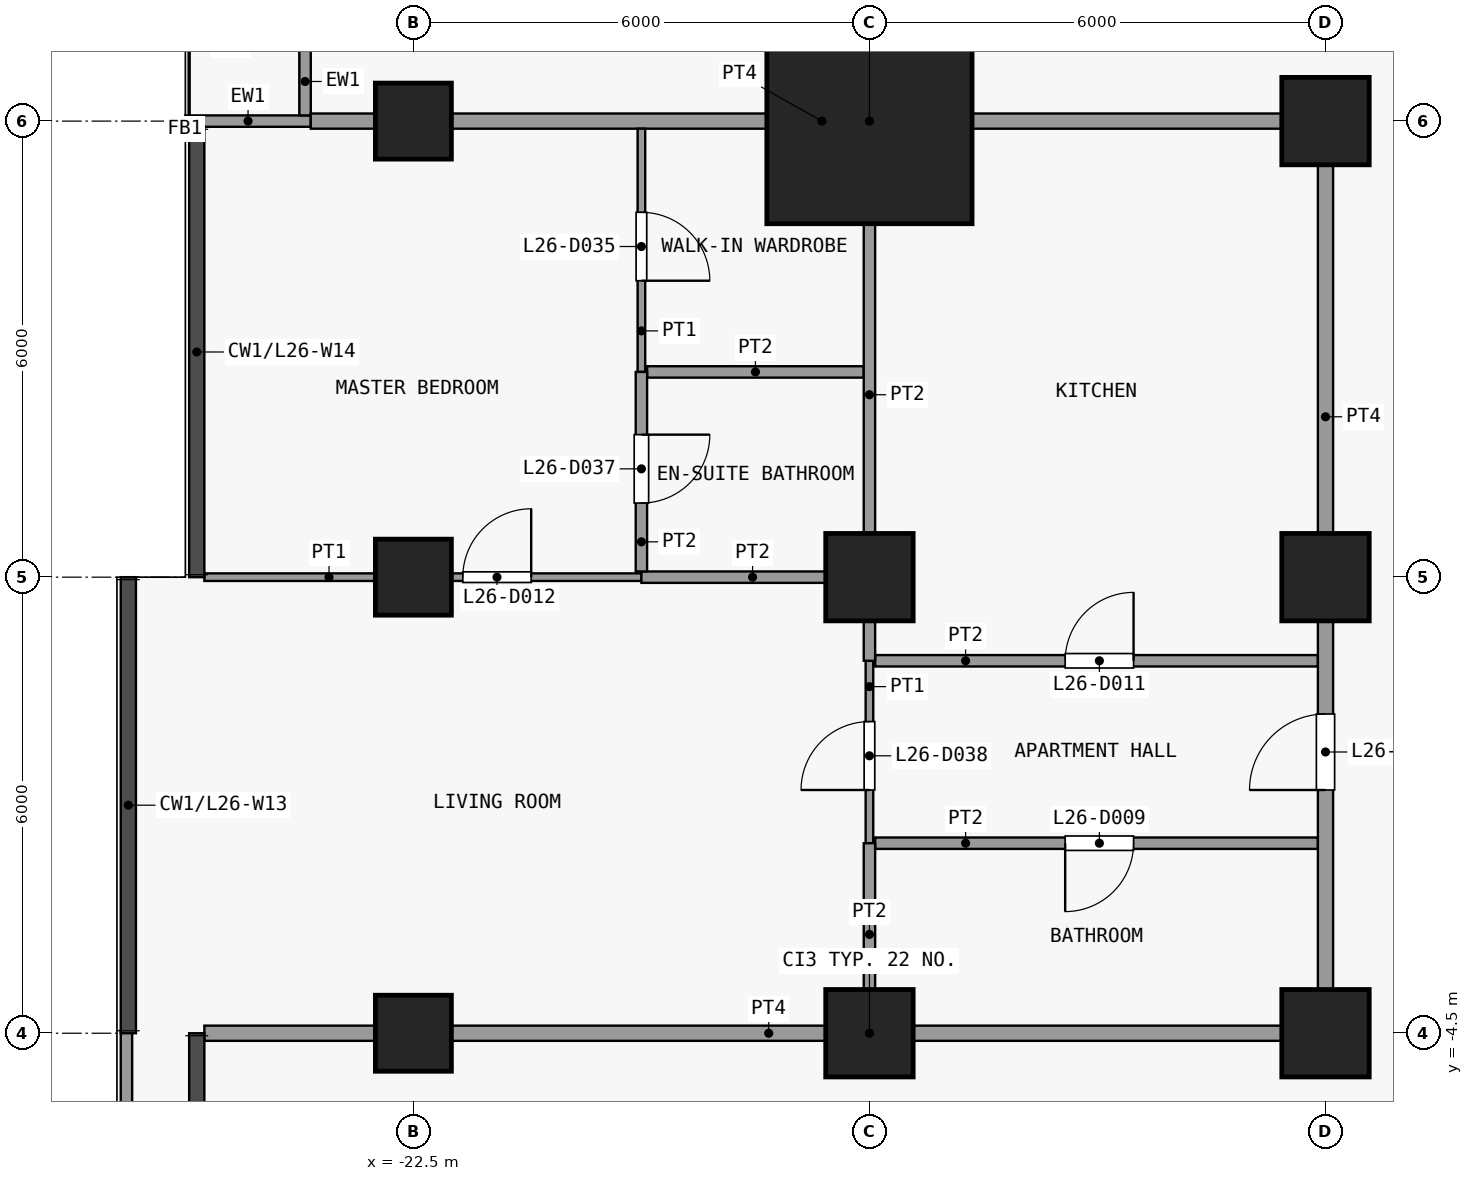
"""IFC4 building model, lengths in metres.
Left out: names, types, materials, properties, quantities, classifications, styles, units other than length and angle.
Written with IfcOpenShell. Run it as: python <this file> out.ifc"""

import sys

from ifc_helpers import new_model, si_unit, direction, frame, frame_2d, origin, origin_2d, place, context, subcontext, project, spatial, rectangle, extrude, element, fill, save


model = new_model("IFC4")
c1 = context("Model", 3, precision=1e-05, world=origin(), true_north=direction((0.0, 1.0)))
c2 = subcontext(c1, "Body", "Model", "MODEL_VIEW")
j1 = project(units=[si_unit("LENGTHUNIT", "METRE"), si_unit("PLANEANGLEUNIT", "RADIAN")], contexts=[c1])
p1 = place(None, origin())
s1 = spatial("IfcSite", under=j1, at=p1, CompositionType="ELEMENT")
p2 = place(p1, origin())
s2 = spatial("IfcBuilding", under=s1, at=p2, CompositionType="ELEMENT")
p3 = place(p2, frame((0.0, 0.0, 106.3)))
s3 = spatial("IfcBuildingStorey", under=s2, at=p3, CompositionType="ELEMENT", Elevation=106.3)
for number, where, z_axis, x_axis in (
    (1, (-22.5, -4.5, 0.0), (0.0, 0.0, 1.0), (1.0, 0.0, 0.0)),
    (2, (-22.5, 1.5, 0.0), (0.0, 0.0, 1.0), (1.0, 0.0, 0.0)),
    (3, (-22.5, 7.5, 0.0), (0.0, 0.0, 1.0), (1.0, 0.0, 0.0)),
):
    element("IfcColumn", number, at=place(p3, frame(where, z_axis=z_axis, x_axis=x_axis)), inside=s3, PredefinedType="COLUMN", context=c2, shape_type="SweptSolid", body=[
        extrude(rectangle(XDim=1.0, YDim=1.0, at=origin_2d()), origin(), (0.0, 0.0, 1.0), 3.6),
    ])
for number, where, z_axis, x_axis in (
    (4, (-16.5, -4.5, 0.0), (0.0, 0.0, 1.0), (1.0, 0.0, 0.0)),
    (5, (-16.5, 1.5, 0.0), (0.0, 0.0, 1.0), (1.0, 0.0, 0.0)),
):
    element("IfcColumn", number, at=place(p3, frame(where, z_axis=z_axis, x_axis=x_axis)), inside=s3, PredefinedType="COLUMN", context=c2, shape_type="SweptSolid", body=[
        extrude(rectangle(XDim=1.15, YDim=1.15, at=origin_2d()), origin(), (0.0, 0.0, 1.0), 3.6),
    ])
p4 = place(p3, frame((-16.5, 7.5, 0.0), z_axis=(0.0, 0.0, 1.0), x_axis=(1.0, 0.0, 0.0)))
e6 = element("IfcColumn", 6, at=p4, inside=s3, PredefinedType="COLUMN", context=c2, shape_type="SweptSolid", body=[
    extrude(rectangle(XDim=2.7, YDim=2.7, at=origin_2d()), origin(), (0.0, 0.0, 1.0), 3.6),
])
for number, where, z_axis, x_axis in (
    (7, (-10.5, -4.5, 0.0), (0.0, 0.0, 1.0), (1.0, 0.0, 0.0)),
    (8, (-10.5, 1.5, 0.0), (0.0, 0.0, 1.0), (1.0, 0.0, 0.0)),
    (9, (-10.5, 7.5, 0.0), (0.0, 0.0, 1.0), (1.0, 0.0, 0.0)),
):
    element("IfcColumn", number, at=place(p3, frame(where, z_axis=z_axis, x_axis=x_axis)), inside=s3, PredefinedType="COLUMN", context=c2, shape_type="SweptSolid", body=[
        extrude(rectangle(XDim=1.15, YDim=1.15, at=origin_2d()), origin(), (0.0, 0.0, 1.0), 3.6),
    ])
p5 = place(p3, frame((-23.85, 7.5, 0.0), z_axis=(0.0, 0.0, 1.0), x_axis=(-1.0, 0.0, 0.0)))
e10 = element("IfcWall", 10, at=p5, inside=s3, PredefinedType="SOLIDWALL", context=c2, shape_type="SweptSolid", body=[
    extrude(rectangle(XDim=1.65, YDim=0.15, at=frame_2d((0.825, 0.0))), origin(), (0.0, 0.0, 1.0), 3.3),
])
p6 = place(p3, frame((-23.925, 7.575, 0.0), z_axis=(0.0, 0.0, 1.0), x_axis=(0.0, 1.0, 0.0)))
e11 = element("IfcWall", 11, at=p6, inside=s3, PredefinedType="SOLIDWALL", context=c2, shape_type="SweptSolid", body=[
    extrude(rectangle(XDim=5.85, YDim=0.15, at=frame_2d((2.925, 0.0))), origin(), (0.0, 0.0, 1.0), 3.3),
])
p7 = place(p6, frame((3.825, 0.0, 0.0)))
e12 = element("IfcOpeningElement", 12, at=p7, cuts=e11, PredefinedType="OPENING", context=c2, shape_type="SweptSolid", body=[
    extrude(rectangle(XDim=1.2, YDim=2.4, at=frame_2d((0.6, 1.2))), frame((0.0, 0.085, 0.0), z_axis=(0.0, -1.0, 0.0), x_axis=(1.0, 0.0, 0.0)), (0.0, 0.0, 1.0), 0.17),
])
p8 = place(p6, frame((1.012, 0.0, 0.9)))
e13 = element("IfcOpeningElement", 13, at=p8, cuts=e11, PredefinedType="OPENING", context=c2, shape_type="SweptSolid", body=[
    extrude(rectangle(XDim=1.8, YDim=2.1, at=frame_2d((0.9, 1.05))), frame((0.0, 0.085, 0.0), z_axis=(0.0, -1.0, 0.0), x_axis=(1.0, 0.0, 0.0)), (0.0, 0.0, 1.0), 0.17),
])
p9 = place(p3, frame((-26.275, -13.3, 0.0), z_axis=(0.0, 0.0, 1.0), x_axis=(0.0, 1.0, 0.0)))
e14 = element("IfcWall", 14, at=p9, inside=s3, PredefinedType="PARAPET", context=c2, shape_type="SweptSolid", body=[
    extrude(rectangle(XDim=8.84, YDim=0.15, at=frame_2d((4.42, 0.0))), origin(), (0.0, 0.0, 1.0), 1.15),
])
p10 = place(p3, frame((-25.25, -4.5, 0.0), z_axis=(0.0, 0.0, 1.0), x_axis=(1.0, 0.0, 0.0)))
e15 = element("IfcWall", 15, at=p10, inside=s3, PredefinedType="PARTITIONING", context=c2, shape_type="SweptSolid", body=[
    extrude(rectangle(XDim=14.85, YDim=0.2, at=frame_2d((7.425, 0.0))), origin(), (0.0, 0.0, 1.0), 3.3),
])
p11 = place(p3, frame((-16.425, -2.0, 0.0), z_axis=(0.0, 0.0, 1.0), x_axis=(1.0, 0.0, 0.0)))
e16 = element("IfcWall", 16, at=p11, inside=s3, PredefinedType="PARTITIONING", context=c2, shape_type="SweptSolid", body=[
    extrude(rectangle(XDim=5.825, YDim=0.15, at=frame_2d((2.913, 0.0))), origin(), (0.0, 0.0, 1.0), 3.3),
])
p12 = place(p11, frame((2.5, 0.0, 0.0)))
e17 = element("IfcOpeningElement", 17, at=p12, cuts=e16, PredefinedType="OPENING", context=c2, shape_type="SweptSolid", body=[
    extrude(rectangle(XDim=0.9, YDim=2.1, at=frame_2d((0.45, 1.05))), frame((0.0, 0.085, 0.0), z_axis=(0.0, -1.0, 0.0), x_axis=(1.0, 0.0, 0.0)), (0.0, 0.0, 1.0), 0.17),
])
p13 = place(p3, frame((-16.425, 0.4, 0.0), z_axis=(0.0, 0.0, 1.0), x_axis=(1.0, 0.0, 0.0)))
e18 = element("IfcWall", 18, at=p13, inside=s3, PredefinedType="PARTITIONING", context=c2, shape_type="SweptSolid", body=[
    extrude(rectangle(XDim=5.825, YDim=0.15, at=frame_2d((2.913, 0.0))), origin(), (0.0, 0.0, 1.0), 3.3),
])
p14 = place(p13, frame((2.5, 0.0, 0.0)))
e19 = element("IfcOpeningElement", 19, at=p14, cuts=e18, PredefinedType="OPENING", context=c2, shape_type="SweptSolid", body=[
    extrude(rectangle(XDim=0.9, YDim=2.1, at=frame_2d((0.45, 1.05))), frame((0.0, 0.085, 0.0), z_axis=(0.0, -1.0, 0.0), x_axis=(1.0, 0.0, 0.0)), (0.0, 0.0, 1.0), 0.17),
])
p15 = place(p3, frame((-25.25, 1.5, 0.0), z_axis=(0.0, 0.0, 1.0), x_axis=(1.0, 0.0, 0.0)))
e20 = element("IfcWall", 20, at=p15, inside=s3, PredefinedType="PARTITIONING", context=c2, shape_type="SweptSolid", body=[
    extrude(rectangle(XDim=5.75, YDim=0.1, at=frame_2d((2.875, 0.0))), origin(), (0.0, 0.0, 1.0), 3.3),
])
p16 = place(p15, frame((3.4, 0.0, 0.0)))
e21 = element("IfcOpeningElement", 21, at=p16, cuts=e20, PredefinedType="OPENING", context=c2, shape_type="SweptSolid", body=[
    extrude(rectangle(XDim=0.9, YDim=2.1, at=frame_2d((0.45, 1.05))), frame((0.0, 0.06, 0.0), z_axis=(0.0, -1.0, 0.0), x_axis=(1.0, 0.0, 0.0)), (0.0, 0.0, 1.0), 0.12),
])
p17 = place(p3, frame((-19.5, 1.5, 0.0), z_axis=(0.0, 0.0, 1.0), x_axis=(1.0, 0.0, 0.0)))
e22 = element("IfcWall", 22, at=p17, inside=s3, PredefinedType="PARTITIONING", context=c2, shape_type="SweptSolid", body=[
    extrude(rectangle(XDim=2.925, YDim=0.15, at=frame_2d((1.462, 0.0))), origin(), (0.0, 0.0, 1.0), 3.3),
])
p18 = place(p3, frame((-19.425, 4.2, 0.0), z_axis=(0.0, 0.0, 1.0), x_axis=(1.0, 0.0, 0.0)))
e23 = element("IfcWall", 23, at=p18, inside=s3, PredefinedType="PARTITIONING", context=c2, shape_type="SweptSolid", body=[
    extrude(rectangle(XDim=2.85, YDim=0.15, at=frame_2d((1.425, 0.0))), origin(), (0.0, 0.0, 1.0), 3.3),
])
p19 = place(p3, frame((-23.85, 7.5, 0.0), z_axis=(0.0, 0.0, 1.0), x_axis=(1.0, 0.0, 0.0)))
e24 = element("IfcWall", 24, at=p19, inside=s3, PredefinedType="PARTITIONING", context=c2, shape_type="SweptSolid", body=[
    extrude(rectangle(XDim=13.45, YDim=0.2, at=frame_2d((6.725, 0.0))), origin(), (0.0, 0.0, 1.0), 3.3),
])
p20 = place(p3, frame((-19.5, 4.2, 0.0), z_axis=(0.0, 0.0, 1.0), x_axis=(0.0, 1.0, 0.0)))
e25 = element("IfcWall", 25, at=p20, inside=s3, PredefinedType="PARTITIONING", context=c2, shape_type="SweptSolid", body=[
    extrude(rectangle(XDim=3.2, YDim=0.1, at=frame_2d((1.6, 0.0))), origin(), (0.0, 0.0, 1.0), 3.3),
])
p21 = place(p20, frame((1.2, 0.0, 0.0)))
e26 = element("IfcOpeningElement", 26, at=p21, cuts=e25, PredefinedType="OPENING", context=c2, shape_type="SweptSolid", body=[
    extrude(rectangle(XDim=0.9, YDim=2.1, at=frame_2d((0.45, 1.05))), frame((0.0, 0.06, 0.0), z_axis=(0.0, -1.0, 0.0), x_axis=(1.0, 0.0, 0.0)), (0.0, 0.0, 1.0), 0.12),
])
p22 = place(p3, frame((-19.5, 1.575, 0.0), z_axis=(0.0, 0.0, 1.0), x_axis=(0.0, 1.0, 0.0)))
e27 = element("IfcWall", 27, at=p22, inside=s3, PredefinedType="PARTITIONING", context=c2, shape_type="SweptSolid", body=[
    extrude(rectangle(XDim=2.625, YDim=0.15, at=frame_2d((1.312, 0.0))), origin(), (0.0, 0.0, 1.0), 3.3),
])
p23 = place(p22, frame((0.9, 0.0, 0.0)))
e28 = element("IfcOpeningElement", 28, at=p23, cuts=e27, PredefinedType="OPENING", context=c2, shape_type="SweptSolid", body=[
    extrude(rectangle(XDim=0.9, YDim=2.1, at=frame_2d((0.45, 1.05))), frame((0.0, 0.085, 0.0), z_axis=(0.0, -1.0, 0.0), x_axis=(1.0, 0.0, 0.0)), (0.0, 0.0, 1.0), 0.17),
])
p24 = place(p3, frame((-16.5, -2.0, 0.0), z_axis=(0.0, 0.0, 1.0), x_axis=(0.0, 1.0, 0.0)))
e29 = element("IfcWall", 29, at=p24, inside=s3, PredefinedType="PARTITIONING", context=c2, shape_type="SweptSolid", body=[
    extrude(rectangle(XDim=2.4, YDim=0.1, at=frame_2d((1.2, 0.0))), origin(), (0.0, 0.0, 1.0), 3.3),
])
p25 = place(p24, frame((0.7, 0.0, 0.0)))
e30 = element("IfcOpeningElement", 30, at=p25, cuts=e29, PredefinedType="OPENING", context=c2, shape_type="SweptSolid", body=[
    extrude(rectangle(XDim=0.9, YDim=2.1, at=frame_2d((0.45, 1.05))), frame((0.0, 0.06, 0.0), z_axis=(0.0, -1.0, 0.0), x_axis=(1.0, 0.0, 0.0)), (0.0, 0.0, 1.0), 0.12),
])
p26 = place(p3, frame((-16.5, -4.4, 0.0), z_axis=(0.0, 0.0, 1.0), x_axis=(0.0, 1.0, 0.0)))
e31 = element("IfcWall", 31, at=p26, inside=s3, PredefinedType="PARTITIONING", context=c2, shape_type="SweptSolid", body=[
    extrude(rectangle(XDim=2.4, YDim=0.15, at=frame_2d((1.2, 0.0))), origin(), (0.0, 0.0, 1.0), 3.3),
])
p27 = place(p3, frame((-16.5, 0.4, 0.0), z_axis=(0.0, 0.0, 1.0), x_axis=(0.0, 1.0, 0.0)))
e32 = element("IfcWall", 32, at=p27, inside=s3, PredefinedType="PARTITIONING", context=c2, shape_type="SweptSolid", body=[
    extrude(rectangle(XDim=7.0, YDim=0.15, at=frame_2d((3.5, 0.0))), origin(), (0.0, 0.0, 1.0), 3.3),
])
p28 = place(p3, frame((-10.5, -4.4, 0.0), z_axis=(0.0, 0.0, 1.0), x_axis=(0.0, 1.0, 0.0)))
e33 = element("IfcWall", 33, at=p28, inside=s3, PredefinedType="PARTITIONING", context=c2, shape_type="SweptSolid", body=[
    extrude(rectangle(XDim=11.8, YDim=0.2, at=frame_2d((5.9, 0.0))), origin(), (0.0, 0.0, 1.0), 3.3),
])
p29 = place(p28, frame((3.1, 0.0, 0.0)))
e34 = element("IfcOpeningElement", 34, at=p29, cuts=e33, PredefinedType="OPENING", context=c2, shape_type="SweptSolid", body=[
    extrude(rectangle(XDim=1.0, YDim=2.1, at=frame_2d((0.5, 1.05))), frame((0.0, 0.11, 0.0), z_axis=(0.0, -1.0, 0.0), x_axis=(1.0, 0.0, 0.0)), (0.0, 0.0, 1.0), 0.22),
])
p30 = place(p12, origin())
e35 = element("IfcDoor", 35, at=p30, inside=s3, OperationType="SINGLE_SWING_LEFT", PredefinedType="DOOR", context=c2, shape_type="SweptSolid", body=[
    extrude(rectangle(XDim=0.9, YDim=2.1, at=frame_2d((0.45, 1.05))), frame((0.0, 0.025, 0.0), z_axis=(0.0, -1.0, 0.0), x_axis=(1.0, 0.0, 0.0)), (0.0, 0.0, 1.0), 0.05),
])
fill(e17, e35)
p31 = place(p14, origin())
e36 = element("IfcDoor", 36, at=p31, inside=s3, OperationType="SINGLE_SWING_LEFT", PredefinedType="DOOR", context=c2, shape_type="SweptSolid", body=[
    extrude(rectangle(XDim=0.9, YDim=2.1, at=frame_2d((0.45, 1.05))), frame((0.0, 0.025, 0.0), z_axis=(0.0, -1.0, 0.0), x_axis=(1.0, 0.0, 0.0)), (0.0, 0.0, 1.0), 0.05),
])
fill(e19, e36)
p32 = place(p16, origin())
e37 = element("IfcDoor", 37, at=p32, inside=s3, OperationType="SINGLE_SWING_LEFT", PredefinedType="DOOR", context=c2, shape_type="SweptSolid", body=[
    extrude(rectangle(XDim=0.9, YDim=2.1, at=frame_2d((0.45, 1.05))), frame((0.0, 0.025, 0.0), z_axis=(0.0, -1.0, 0.0), x_axis=(1.0, 0.0, 0.0)), (0.0, 0.0, 1.0), 0.05),
])
fill(e21, e37)
p33 = place(p21, origin())
e38 = element("IfcDoor", 38, at=p33, inside=s3, OperationType="SINGLE_SWING_LEFT", PredefinedType="DOOR", context=c2, shape_type="SweptSolid", body=[
    extrude(rectangle(XDim=0.9, YDim=2.1, at=frame_2d((0.45, 1.05))), frame((0.0, 0.025, 0.0), z_axis=(0.0, -1.0, 0.0), x_axis=(1.0, 0.0, 0.0)), (0.0, 0.0, 1.0), 0.05),
])
fill(e26, e38)
p34 = place(p23, origin())
e39 = element("IfcDoor", 39, at=p34, inside=s3, OperationType="SINGLE_SWING_RIGHT", PredefinedType="DOOR", context=c2, shape_type="SweptSolid", body=[
    extrude(rectangle(XDim=0.9, YDim=2.1, at=frame_2d((0.45, 1.05))), frame((0.0, 0.025, 0.0), z_axis=(0.0, -1.0, 0.0), x_axis=(1.0, 0.0, 0.0)), (0.0, 0.0, 1.0), 0.05),
])
fill(e28, e39)
p35 = place(p25, origin())
e40 = element("IfcDoor", 40, at=p35, inside=s3, OperationType="SINGLE_SWING_RIGHT", PredefinedType="DOOR", context=c2, shape_type="SweptSolid", body=[
    extrude(rectangle(XDim=0.9, YDim=2.1, at=frame_2d((0.45, 1.05))), frame((0.0, 0.025, 0.0), z_axis=(0.0, -1.0, 0.0), x_axis=(1.0, 0.0, 0.0)), (0.0, 0.0, 1.0), 0.05),
])
fill(e30, e40)
p36 = place(p29, origin())
e41 = element("IfcDoor", 41, at=p36, inside=s3, OperationType="SINGLE_SWING_RIGHT", PredefinedType="DOOR", context=c2, shape_type="SweptSolid", body=[
    extrude(rectangle(XDim=1.0, YDim=2.1, at=frame_2d((0.5, 1.05))), frame((0.0, 0.025, 0.0), z_axis=(0.0, -1.0, 0.0), x_axis=(1.0, 0.0, 0.0)), (0.0, 0.0, 1.0), 0.05),
])
fill(e34, e41)
save(model, sys.argv[1])
